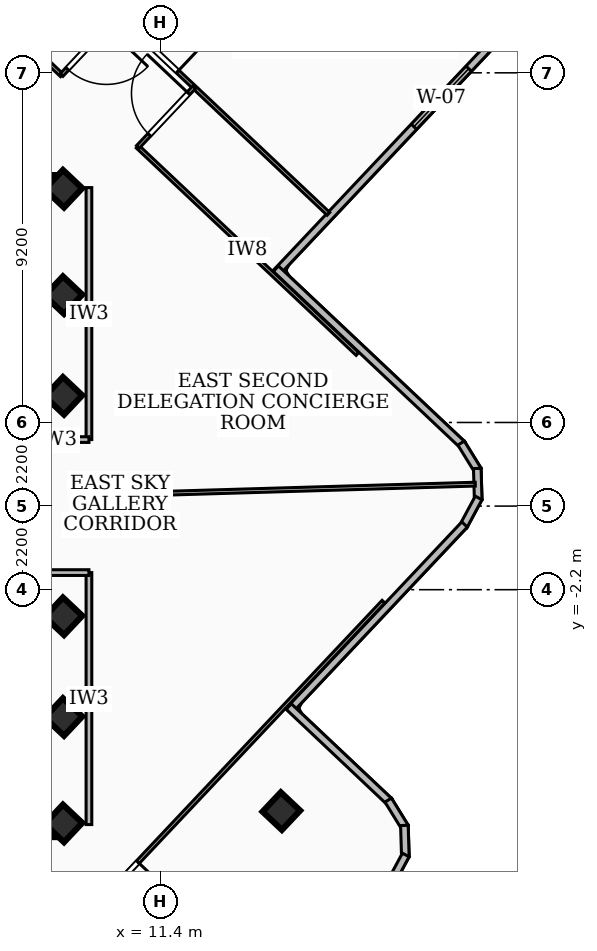
"""IFC4 building model, lengths in metres.
Left out: names, types, materials, properties, quantities, classifications, styles, units other than length and angle.
Written with IfcOpenShell. Run it as: python <this file> out.ifc"""

import sys

from ifc_helpers import new_model, si_unit, direction, frame, frame_2d, origin, origin_2d, place, context, subcontext, project, spatial, rectangle, extrude, element, fill, save


model = new_model("IFC4")
c1 = context("Model", 3, precision=1e-05, world=origin(), true_north=direction((0.0, 1.0)))
c2 = subcontext(c1, "Body", "Model", "MODEL_VIEW")
j1 = project(units=[si_unit("LENGTHUNIT", "METRE"), si_unit("PLANEANGLEUNIT", "RADIAN")], contexts=[c1])
p1 = place(None, origin())
s1 = spatial("IfcSite", under=j1, at=p1, CompositionType="ELEMENT")
p2 = place(p1, origin())
s2 = spatial("IfcBuilding", under=s1, at=p2, CompositionType="ELEMENT")
p3 = place(p2, frame((0.0, 0.0, 247.5)))
s3 = spatial("IfcBuildingStorey", under=s2, at=p3, CompositionType="ELEMENT", Elevation=247.5)
for number, where, z_axis, x_axis in (
    (1, (-8.78, 8.51, 0.0), (0.0, 0.0, 1.0), (1.0, 0.0, 0.0)),
    (2, (8.78, -8.51, 0.0), (0.0, 0.0, 1.0), (-1.0, 0.0, 0.0)),
):
    element("IfcWall", number, at=place(p3, frame(where, z_axis=z_axis, x_axis=x_axis)), inside=s3, PredefinedType="SHEAR", context=c2, shape_type="SweptSolid", body=[
        extrude(rectangle(XDim=17.56, YDim=0.4, at=frame_2d((8.78, 0.0))), origin(), (0.0, 0.0, 1.0), 3.16),
    ])
for number, where, z_axis, x_axis in (
    (3, (8.85, -5.55, 0.0), (0.0, 0.0, 1.0), (0.686, 0.728, 0.0)),
    (4, (8.85, -2.9, 0.0), (0.0, 0.0, 1.0), (0.686, 0.728, 0.0)),
    (5, (8.85, 2.9, 0.0), (0.0, 0.0, 1.0), (0.686, 0.728, 0.0)),
    (6, (8.85, 5.55, 0.0), (0.0, 0.0, 1.0), (0.686, 0.728, 0.0)),
    (7, (8.85, -8.35, 0.0), (0.0, 0.0, 1.0), (0.686, 0.728, 0.0)),
    (8, (8.85, 8.35, 0.0), (0.0, 0.0, 1.0), (0.686, 0.728, 0.0)),
    (9, (14.583, -8.026, 0.0), (0.0, 0.0, 1.0), (0.686, 0.728, 0.0)),
):
    element("IfcColumn", number, at=place(p3, frame(where, z_axis=z_axis, x_axis=x_axis)), inside=s3, PredefinedType="COLUMN", context=c2, shape_type="SweptSolid", body=[
        extrude(rectangle(XDim=0.7, YDim=0.7, at=origin_2d()), origin(), (0.0, 0.0, 1.0), 3.42),
    ])
p4 = place(p3, frame((20.097, 12.128, 0.0), z_axis=(0.0, 0.0, 1.0), x_axis=(-0.686187598971, -0.72742462085, 0.0)))
e10 = element("IfcWall", 10, at=p4, inside=s3, PredefinedType="SOLIDWALL", context=c2, shape_type="SweptSolid", body=[
    extrude(rectangle(XDim=8.241, YDim=0.2, at=frame_2d((4.121, 0.0))), origin(), (0.0, 0.0, 1.0), 3.16),
])
p5 = place(p4, frame((0.85, 0.0, 0.85)))
e11 = element("IfcOpeningElement", 11, at=p5, cuts=e10, PredefinedType="OPENING", context=c2, shape_type="SweptSolid", body=[
    extrude(rectangle(XDim=2.1, YDim=1.8, at=frame_2d((1.05, 0.9))), frame((0.0, 0.11, 0.0), z_axis=(0.0, -1.0, 0.0), x_axis=(1.0, 0.0, 0.0)), (0.0, 0.0, 1.0), 0.22),
])
p6 = place(p3, frame((14.439, 6.246, 0.0), z_axis=(0.0, 0.0, 1.0), x_axis=(0.727497998064, -0.686109803758, 0.0)))
e12 = element("IfcWall", 12, at=p6, inside=s3, PredefinedType="SOLIDWALL", context=c2, shape_type="SweptSolid", body=[
    extrude(rectangle(XDim=6.742, YDim=0.2, at=frame_2d((3.371, 0.0))), origin(), (0.0, 0.0, 1.0), 3.16),
])
p7 = place(p3, frame((19.313, 1.658, 0.0), z_axis=(0.0, 0.0, 1.0), x_axis=(0.52517019965, -0.850997215859, 0.0)))
e13 = element("IfcWall", 13, at=p7, inside=s3, PredefinedType="SOLIDWALL", context=c2, shape_type="SweptSolid", body=[
    extrude(rectangle(XDim=0.838, YDim=0.2, at=frame_2d((0.419, 0.0))), origin(), (0.0, 0.0, 1.0), 3.16),
])
p8 = place(p3, frame((19.739, 0.991, 0.0), z_axis=(0.0, 0.0, 1.0), x_axis=(0.029024803491, -0.999578691641, 0.0)))
e14 = element("IfcWall", 14, at=p8, inside=s3, PredefinedType="SOLIDWALL", context=c2, shape_type="SweptSolid", body=[
    extrude(rectangle(XDim=0.824, YDim=0.2, at=frame_2d((0.412, 0.0))), origin(), (0.0, 0.0, 1.0), 3.16),
])
p9 = place(p3, frame((19.774, 0.214, 0.0), z_axis=(0.0, 0.0, 1.0), x_axis=(-0.474603278561, -0.880199822755, 0.0)))
e15 = element("IfcWall", 15, at=p9, inside=s3, PredefinedType="SOLIDWALL", context=c2, shape_type="SweptSolid", body=[
    extrude(rectangle(XDim=0.838, YDim=0.2, at=frame_2d((0.419, 0.0))), origin(), (0.0, 0.0, 1.0), 3.16),
])
p10 = place(p3, frame((19.405, -0.484, 0.0), z_axis=(0.0, 0.0, 1.0), x_axis=(-0.686028756372, -0.727574426042, 0.0)))
e16 = element("IfcWall", 16, at=p10, inside=s3, PredefinedType="SOLIDWALL", context=c2, shape_type="SweptSolid", body=[
    extrude(rectangle(XDim=6.74, YDim=0.2, at=frame_2d((3.37, 0.0))), origin(), (0.0, 0.0, 1.0), 3.16),
])
p11 = place(p3, frame((14.778, -5.275, 0.0), z_axis=(0.0, 0.0, 1.0), x_axis=(0.727262285553, -0.686359649172, 0.0)))
e17 = element("IfcWall", 17, at=p11, inside=s3, PredefinedType="SOLIDWALL", context=c2, shape_type="SweptSolid", body=[
    extrude(rectangle(XDim=3.641, YDim=0.2, at=frame_2d((1.82, 0.0))), origin(), (0.0, 0.0, 1.0), 3.16),
])
p12 = place(p3, frame((17.395, -7.736, 0.0), z_axis=(0.0, 0.0, 1.0), x_axis=(0.52517019965, -0.850997215859, 0.0)))
e18 = element("IfcWall", 18, at=p12, inside=s3, PredefinedType="SOLIDWALL", context=c2, shape_type="SweptSolid", body=[
    extrude(rectangle(XDim=0.838, YDim=0.2, at=frame_2d((0.419, 0.0))), origin(), (0.0, 0.0, 1.0), 3.16),
])
p13 = place(p3, frame((17.821, -8.403, 0.0), z_axis=(0.0, 0.0, 1.0), x_axis=(0.030208429442, -0.999543621255, 0.0)))
e19 = element("IfcWall", 19, at=p13, inside=s3, PredefinedType="SOLIDWALL", context=c2, shape_type="SweptSolid", body=[
    extrude(rectangle(XDim=0.824, YDim=0.2, at=frame_2d((0.412, 0.0))), origin(), (0.0, 0.0, 1.0), 3.16),
])
p14 = place(p3, frame((17.857, -9.18, 0.0), z_axis=(0.0, 0.0, 1.0), x_axis=(-0.474603278561, -0.880199822755, 0.0)))
e20 = element("IfcWall", 20, at=p14, inside=s3, PredefinedType="SOLIDWALL", context=c2, shape_type="SweptSolid", body=[
    extrude(rectangle(XDim=0.838, YDim=0.2, at=frame_2d((0.419, 0.0))), origin(), (0.0, 0.0, 1.0), 3.16),
])
p15 = place(p3, frame((9.52, 1.75, 0.0), z_axis=(0.0, 0.0, 1.0), x_axis=(0.0, 1.0, 0.0)))
e21 = element("IfcWall", 21, at=p15, inside=s3, PredefinedType="PARTITIONING", context=c2, shape_type="SweptSolid", body=[
    extrude(rectangle(XDim=6.63, YDim=0.15, at=frame_2d((3.315, 0.0))), origin(), (0.0, 0.0, 1.0), 3.16),
])
p16 = place(p3, frame((7.85, 1.75, 0.0), z_axis=(0.0, 0.0, 1.0), x_axis=(1.0, 0.0, 0.0)))
e22 = element("IfcWall", 22, at=p16, inside=s3, PredefinedType="PARTITIONING", context=c2, shape_type="SweptSolid", body=[
    extrude(rectangle(XDim=1.67, YDim=0.15, at=frame_2d((0.835, 0.0))), origin(), (0.0, 0.0, 1.0), 2.39),
])
p17 = place(p3, frame((9.52, -8.38, 0.0), z_axis=(0.0, 0.0, 1.0), x_axis=(0.0, 1.0, 0.0)))
e23 = element("IfcWall", 23, at=p17, inside=s3, PredefinedType="PARTITIONING", context=c2, shape_type="SweptSolid", body=[
    extrude(rectangle(XDim=6.63, YDim=0.15, at=frame_2d((3.315, 0.0))), origin(), (0.0, 0.0, 1.0), 2.53),
])
p18 = place(p3, frame((7.85, -1.75, 0.0), z_axis=(0.0, 0.0, 1.0), x_axis=(1.0, 0.0, 0.0)))
e24 = element("IfcWall", 24, at=p18, inside=s3, PredefinedType="PARTITIONING", context=c2, shape_type="SweptSolid", body=[
    extrude(rectangle(XDim=1.67, YDim=0.15, at=frame_2d((0.835, 0.0))), origin(), (0.0, 0.0, 1.0), 2.39),
])
p19 = place(p3, frame((11.395, 0.334, 0.0), z_axis=(0.0, 0.0, 1.0), x_axis=(0.999571055306, 0.029286607775, 0.0)))
e25 = element("IfcWall", 25, at=p19, inside=s3, PredefinedType="PARTITIONING", context=c2, shape_type="SweptSolid", body=[
    extrude(rectangle(XDim=8.295, YDim=0.1, at=frame_2d((4.147, 0.0))), origin(), (0.0, 0.0, 1.0), 3.16),
])
p20 = place(p3, frame((8.807, 11.336, 0.0), z_axis=(0.0, 0.0, 1.0), x_axis=(-0.727546923281, 0.68605792352, 0.0)))
e26 = element("IfcWall", 26, at=p20, inside=s3, PredefinedType="PARTITIONING", context=c2, shape_type="SweptSolid", body=[
    extrude(rectangle(XDim=7.95, YDim=0.1, at=frame_2d((3.975, 0.0))), origin(), (0.0, 0.0, 1.0), 3.16),
])
p21 = place(p3, frame((16.585, 4.002, 0.0), z_axis=(0.0, 0.0, 1.0), x_axis=(-0.727485611578, 0.686122937196, 0.0)))
e27 = element("IfcWall", 27, at=p21, inside=s3, PredefinedType="PARTITIONING", context=c2, shape_type="SweptSolid", body=[
    extrude(rectangle(XDim=7.951, YDim=0.1, at=frame_2d((3.975, 0.0))), origin(), (0.0, 0.0, 1.0), 3.16),
])
p22 = place(p3, frame((10.282, 12.915, 0.0), z_axis=(0.0, 0.0, 1.0), x_axis=(-0.685949623464, -0.727649032205, 0.0)))
e28 = element("IfcWall", 28, at=p22, inside=s3, PredefinedType="PARTITIONING", context=c2, shape_type="SweptSolid", body=[
    extrude(rectangle(XDim=2.16, YDim=0.1, at=frame_2d((1.08, 0.0))), origin(), (0.0, 0.0, 1.0), 2.53),
])
p23 = place(p22, frame((0.44, 0.0, 0.0)))
e29 = element("IfcOpeningElement", 29, at=p23, cuts=e28, PredefinedType="OPENING", context=c2, shape_type="SweptSolid", body=[
    extrude(rectangle(XDim=1.5, YDim=2.12, at=frame_2d((0.75, 1.06))), frame((0.0, 0.06, 0.0), z_axis=(0.0, -1.0, 0.0), x_axis=(1.0, 0.0, 0.0)), (0.0, 0.0, 1.0), 0.12),
])
p24 = place(p3, frame((10.808, 9.45, 0.0), z_axis=(0.0, 0.0, 1.0), x_axis=(0.686175284747, 0.727436236795, 0.0)))
e30 = element("IfcWall", 30, at=p24, inside=s3, PredefinedType="PARTITIONING", context=c2, shape_type="SweptSolid", body=[
    extrude(rectangle(XDim=2.16, YDim=0.1, at=frame_2d((1.08, 0.0))), origin(), (0.0, 0.0, 1.0), 3.16),
])
p25 = place(p24, frame((0.44, 0.0, 0.0)))
e31 = element("IfcOpeningElement", 31, at=p25, cuts=e30, PredefinedType="OPENING", context=c2, shape_type="SweptSolid", body=[
    extrude(rectangle(XDim=1.5, YDim=2.12, at=frame_2d((0.75, 1.06))), frame((0.0, 0.06, 0.0), z_axis=(0.0, -1.0, 0.0), x_axis=(1.0, 0.0, 0.0)), (0.0, 0.0, 1.0), 0.12),
])
p26 = place(p3, frame((6.75, 16.246, 0.0), z_axis=(0.0, 0.0, 1.0), x_axis=(0.727488049341, -0.686120352464, 0.0)))
e32 = element("IfcWall", 32, at=p26, inside=s3, PredefinedType="PARTITIONING", context=c2, shape_type="SweptSolid", body=[
    extrude(rectangle(XDim=12.47, YDim=0.1, at=frame_2d((6.235, 0.0))), origin(), (0.0, 0.0, 1.0), 2.53),
])
p27 = place(p26, frame((6.155, 0.0, 0.0)))
e33 = element("IfcOpeningElement", 33, at=p27, cuts=e32, PredefinedType="OPENING", context=c2, shape_type="SweptSolid", body=[
    extrude(rectangle(XDim=0.86, YDim=2.04, at=frame_2d((0.43, 1.02))), frame((0.0, 0.06, 0.0), z_axis=(0.0, -1.0, 0.0), x_axis=(1.0, 0.0, 0.0)), (0.0, 0.0, 1.0), 0.12),
])
p28 = place(p26, frame((4.955, 0.0, 0.0)))
e34 = element("IfcOpeningElement", 34, at=p28, cuts=e32, PredefinedType="OPENING", context=c2, shape_type="SweptSolid", body=[
    extrude(rectangle(XDim=0.86, YDim=2.04, at=frame_2d((0.43, 1.02))), frame((0.0, 0.06, 0.0), z_axis=(0.0, -1.0, 0.0), x_axis=(1.0, 0.0, 0.0)), (0.0, 0.0, 1.0), 0.12),
])
p29 = place(p3, frame((17.271, -2.514, 0.0), z_axis=(0.0, 0.0, 1.0), x_axis=(-0.686068145865, -0.727537283739, 0.0)))
e35 = element("IfcWall", 35, at=p29, inside=s3, PredefinedType="PARTITIONING", context=c2, shape_type="SweptSolid", body=[
    extrude(rectangle(XDim=20.04, YDim=0.1, at=frame_2d((10.02, 0.0))), origin(), (0.0, 0.0, 1.0), 2.53),
])
p30 = place(p29, frame((10.86, 0.0, 0.0)))
e36 = element("IfcOpeningElement", 36, at=p30, cuts=e35, PredefinedType="OPENING", context=c2, shape_type="SweptSolid", body=[
    extrude(rectangle(XDim=0.86, YDim=2.04, at=frame_2d((0.43, 1.02))), frame((0.0, 0.06, 0.0), z_axis=(0.0, -1.0, 0.0), x_axis=(1.0, 0.0, 0.0)), (0.0, 0.0, 1.0), 0.12),
])
p31 = place(p29, frame((9.42, 0.0, 0.0)))
e37 = element("IfcOpeningElement", 37, at=p31, cuts=e35, PredefinedType="OPENING", context=c2, shape_type="SweptSolid", body=[
    extrude(rectangle(XDim=0.86, YDim=2.04, at=frame_2d((0.43, 1.02))), frame((0.0, 0.06, 0.0), z_axis=(0.0, -1.0, 0.0), x_axis=(1.0, 0.0, 0.0)), (0.0, 0.0, 1.0), 0.12),
])
p32 = place(p5, origin())
e38 = element("IfcWindow", 38, at=p32, inside=s3, PartitioningType="SINGLE_PANEL", PredefinedType="WINDOW", context=c2, shape_type="SweptSolid", body=[
    extrude(rectangle(XDim=2.1, YDim=1.8, at=frame_2d((1.05, 0.9))), frame((0.0, 0.03, 0.0), z_axis=(0.0, -1.0, 0.0), x_axis=(1.0, 0.0, 0.0)), (0.0, 0.0, 1.0), 0.06),
])
fill(e11, e38)
p33 = place(p23, origin())
e39 = element("IfcDoor", 39, at=p33, inside=s3, OperationType="SINGLE_SWING_LEFT", PredefinedType="DOOR", context=c2, shape_type="SweptSolid", body=[
    extrude(rectangle(XDim=1.5, YDim=2.12, at=frame_2d((0.75, 1.06))), frame((0.0, 0.025, 0.0), z_axis=(0.0, -1.0, 0.0), x_axis=(1.0, 0.0, 0.0)), (0.0, 0.0, 1.0), 0.05),
])
fill(e29, e39)
p34 = place(p25, origin())
e40 = element("IfcDoor", 40, at=p34, inside=s3, OperationType="SINGLE_SWING_RIGHT", PredefinedType="DOOR", context=c2, shape_type="SweptSolid", body=[
    extrude(rectangle(XDim=1.5, YDim=2.12, at=frame_2d((0.75, 1.06))), frame((0.0, 0.025, 0.0), z_axis=(0.0, -1.0, 0.0), x_axis=(1.0, 0.0, 0.0)), (0.0, 0.0, 1.0), 0.05),
])
fill(e31, e40)
p35 = place(p27, origin())
e41 = element("IfcDoor", 41, at=p35, inside=s3, OperationType="SINGLE_SWING_RIGHT", PredefinedType="DOOR", context=c2, shape_type="SweptSolid", body=[
    extrude(rectangle(XDim=0.86, YDim=2.04, at=frame_2d((0.43, 1.02))), frame((0.0, 0.025, 0.0), z_axis=(0.0, -1.0, 0.0), x_axis=(1.0, 0.0, 0.0)), (0.0, 0.0, 1.0), 0.05),
])
fill(e33, e41)
p36 = place(p31, origin())
e42 = element("IfcDoor", 42, at=p36, inside=s3, OperationType="SINGLE_SWING_LEFT", PredefinedType="DOOR", context=c2, shape_type="SweptSolid", body=[
    extrude(rectangle(XDim=0.86, YDim=2.04, at=frame_2d((0.43, 1.02))), frame((0.0, 0.025, 0.0), z_axis=(0.0, -1.0, 0.0), x_axis=(1.0, 0.0, 0.0)), (0.0, 0.0, 1.0), 0.05),
])
fill(e37, e42)
save(model, sys.argv[1])
